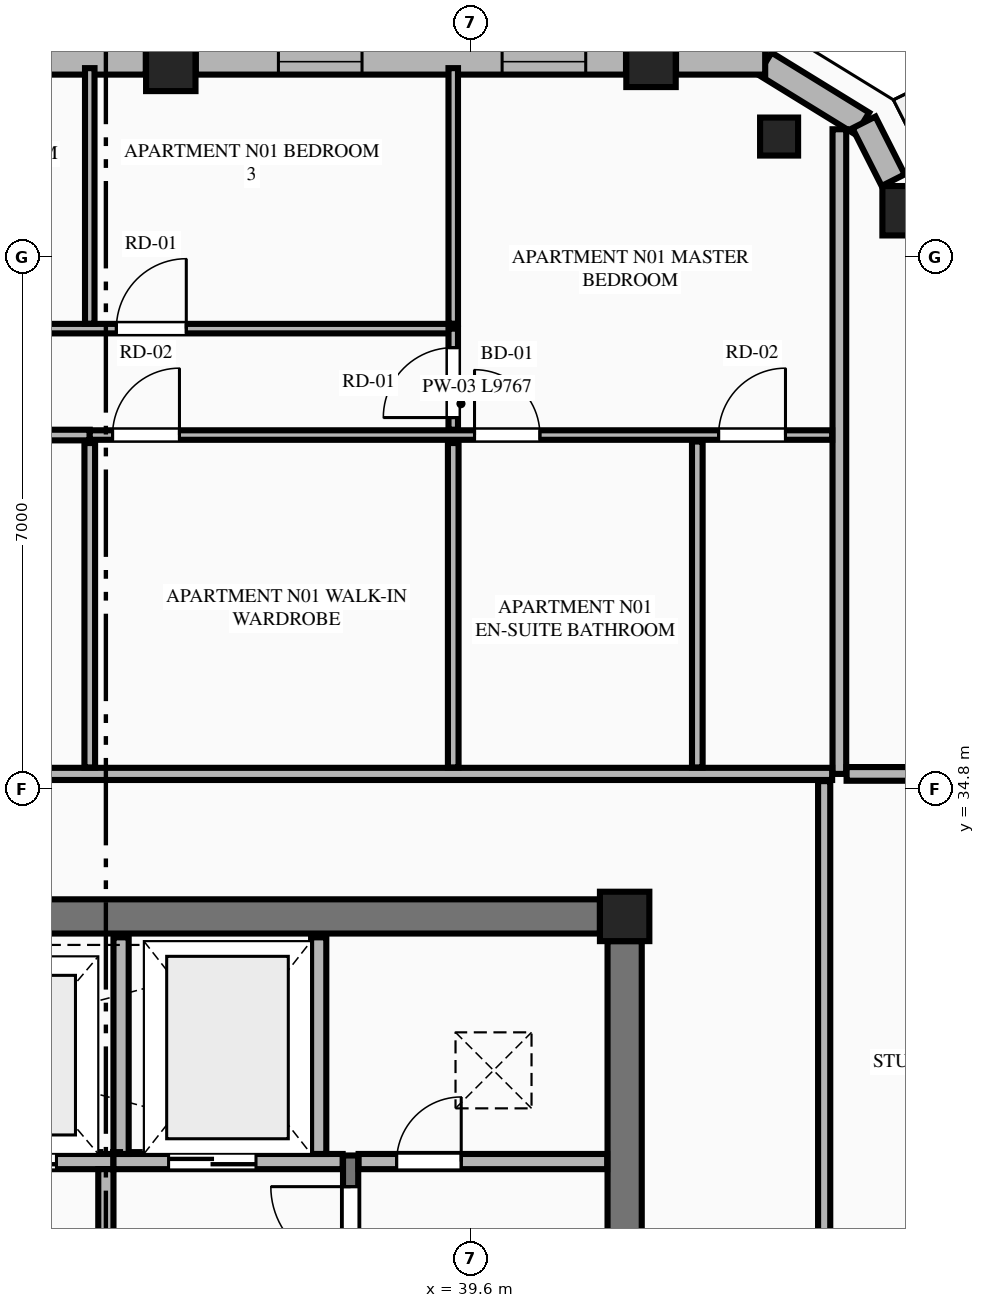
"""IFC4 building model, lengths in metres.
Left out: names, types, materials, properties, quantities, classifications, styles, units other than length and angle.
Written with IfcOpenShell. Run it as: python <this file> out.ifc"""

import sys

from ifc_helpers import new_model, si_unit, direction, frame, frame_2d, origin, origin_2d, place, context, subcontext, project, spatial, rectangle, extrude, element, fill, save


model = new_model("IFC4")
c1 = context("Model", 3, precision=1e-05, world=origin(), true_north=direction((0.0, 1.0)))
c2 = subcontext(c1, "Body", "Model", "MODEL_VIEW")
j1 = project(units=[si_unit("LENGTHUNIT", "METRE"), si_unit("PLANEANGLEUNIT", "RADIAN")], contexts=[c1])
p1 = place(None, origin())
s1 = spatial("IfcSite", under=j1, at=p1, CompositionType="ELEMENT")
p2 = place(p1, origin())
s2 = spatial("IfcBuilding", under=s1, at=p2, CompositionType="ELEMENT")
p3 = place(p2, frame((0.0, 0.0, 283.5)))
s3 = spatial("IfcBuildingStorey", under=s2, at=p3, CompositionType="ELEMENT", Elevation=283.5)
p4 = place(p3, frame((41.625, 33.125, 0.0), z_axis=(0.0, 0.0, 1.0), x_axis=(1.0, 0.0, 0.0)))
e1 = element("IfcColumn", 1, at=p4, inside=s3, PredefinedType="COLUMN", context=c2, shape_type="SweptSolid", body=[
    extrude(rectangle(XDim=0.65, YDim=0.65, at=origin_2d()), origin(), (0.0, 0.0, 1.0), 4.0),
])
p5 = place(p3, frame((23.5, 33.125, 0.0), z_axis=(0.0, 0.0, 1.0), x_axis=(1.0, 0.0, 0.0)))
e2 = element("IfcWall", 2, at=p5, inside=s3, PredefinedType="SHEAR", context=c2, shape_type="SweptSolid", body=[
    extrude(rectangle(XDim=17.8, YDim=0.45, at=frame_2d((8.9, 0.0))), origin(), (0.0, 0.0, 1.0), 3.8),
])
p6 = place(p3, frame((41.625, 19.0, 0.0), z_axis=(0.0, 0.0, 1.0), x_axis=(0.0, 1.0, 0.0)))
e3 = element("IfcWall", 3, at=p6, inside=s3, PredefinedType="SHEAR", context=c2, shape_type="SweptSolid", body=[
    extrude(rectangle(XDim=13.8, YDim=0.45, at=frame_2d((6.9, 0.0))), origin(), (0.0, 0.0, 1.0), 3.8),
])
p7 = place(p6, frame((2.84, 0.0, 0.0)))
e4 = element("IfcOpeningElement", 4, at=p7, cuts=e3, PredefinedType="OPENING", context=c2, shape_type="SweptSolid", body=[
    extrude(rectangle(XDim=1.22, YDim=2.25, at=frame_2d((0.61, 1.125))), frame((0.0, 0.235, 0.0), z_axis=(0.0, -1.0, 0.0), x_axis=(1.0, 0.0, 0.0)), (0.0, 0.0, 1.0), 0.47),
])
for number, where, z_axis, x_axis in (
    (5, (45.341, 42.409, 0.0), (0.0, 0.0, 1.0), (1.0, 0.0, 0.0)),
    (6, (41.972, 44.361, 0.0), (0.0, 0.0, 1.0), (1.0, 0.0, 0.0)),
    (7, (35.654, 44.308, 0.0), (0.0, 0.0, 1.0), (1.0, 0.0, 0.0)),
):
    element("IfcColumn", number, at=place(p3, frame(where, z_axis=z_axis, x_axis=x_axis)), inside=s3, PredefinedType="COLUMN", context=c2, shape_type="SweptSolid", body=[
        extrude(rectangle(XDim=0.65, YDim=0.65, at=origin_2d()), origin(), (0.0, 0.0, 1.0), 4.0),
    ])
p8 = place(p3, frame((43.657, 43.385, 0.0), z_axis=(0.0, 0.0, 1.0), x_axis=(-0.865256437757, 0.501329529272, 0.0)))
e8 = element("IfcColumn", 8, at=p8, inside=s3, PredefinedType="PILASTER", context=c2, shape_type="SweptSolid", body=[
    extrude(rectangle(XDim=0.5, YDim=0.35, at=origin_2d()), origin(), (0.0, 0.0, 1.0), 4.0),
])
p9 = place(p3, frame((38.02, 23.2, 0.0), z_axis=(0.0, 0.0, 1.0), x_axis=(0.0, 1.0, 0.0)))
e9 = element("IfcWall", 9, at=p9, inside=s3, PredefinedType="SHEAR", context=c2, shape_type="SweptSolid", body=[
    extrude(rectangle(XDim=6.78, YDim=0.2, at=frame_2d((3.39, 0.0))), origin(), (0.0, 0.0, 1.0), 4.0),
])
p10 = place(p9, frame((5.32, 0.0, 0.0)))
e10 = element("IfcOpeningElement", 10, at=p10, cuts=e9, PredefinedType="OPENING", context=c2, shape_type="SweptSolid", body=[
    extrude(rectangle(XDim=1.05, YDim=2.15, at=frame_2d((0.525, 1.075))), frame((0.0, 0.11, 0.0), z_axis=(0.0, -1.0, 0.0), x_axis=(1.0, 0.0, 0.0)), (0.0, 0.0, 1.0), 0.22),
])
p11 = place(p3, frame((29.9, 29.9, 0.0), z_axis=(0.0, 0.0, 1.0), x_axis=(1.0, 0.0, 0.0)))
e11 = element("IfcWall", 11, at=p11, inside=s3, PredefinedType="PLUMBINGWALL", context=c2, shape_type="SweptSolid", body=[
    extrude(rectangle(XDim=5.0, YDim=0.2, at=frame_2d((2.5, 0.0))), origin(), (0.0, 0.0, 1.0), 3.8),
])
p12 = place(p11, frame((0.75, 0.0, 0.0)))
e12 = element("IfcOpeningElement", 12, at=p12, cuts=e11, PredefinedType="OPENING", context=c2, shape_type="SweptSolid", body=[
    extrude(rectangle(XDim=1.1, YDim=2.2, at=frame_2d((0.55, 1.1))), frame((0.0, 0.11, 0.0), z_axis=(0.0, -1.0, 0.0), x_axis=(1.0, 0.0, 0.0)), (0.0, 0.0, 1.0), 0.22),
])
p13 = place(p11, frame((3.15, 0.0, 0.0)))
e13 = element("IfcOpeningElement", 13, at=p13, cuts=e11, PredefinedType="OPENING", context=c2, shape_type="SweptSolid", body=[
    extrude(rectangle(XDim=1.1, YDim=2.2, at=frame_2d((0.55, 1.1))), frame((0.0, 0.11, 0.0), z_axis=(0.0, -1.0, 0.0), x_axis=(1.0, 0.0, 0.0)), (0.0, 0.0, 1.0), 0.22),
])
p14 = place(p3, frame((34.9, 29.9, 0.0), z_axis=(0.0, 0.0, 1.0), x_axis=(1.0, 0.0, 0.0)))
e14 = element("IfcWall", 14, at=p14, inside=s3, PredefinedType="PLUMBINGWALL", context=c2, shape_type="SweptSolid", body=[
    extrude(rectangle(XDim=3.015, YDim=0.2, at=frame_2d((1.508, 0.0))), origin(), (0.0, 0.0, 1.0), 3.8),
])
p15 = place(p14, frame((0.725, 0.0, 0.0)))
e15 = element("IfcOpeningElement", 15, at=p15, cuts=e14, PredefinedType="OPENING", context=c2, shape_type="SweptSolid", body=[
    extrude(rectangle(XDim=1.15, YDim=2.2, at=frame_2d((0.575, 1.1))), frame((0.0, 0.11, 0.0), z_axis=(0.0, -1.0, 0.0), x_axis=(1.0, 0.0, 0.0)), (0.0, 0.0, 1.0), 0.22),
])
p16 = place(p3, frame((38.125, 29.9, 0.0), z_axis=(0.0, 0.0, 1.0), x_axis=(1.0, 0.0, 0.0)))
e16 = element("IfcWall", 16, at=p16, inside=s3, PredefinedType="PLUMBINGWALL", context=c2, shape_type="SweptSolid", body=[
    extrude(rectangle(XDim=3.27, YDim=0.2, at=frame_2d((1.635, 0.0))), origin(), (0.0, 0.0, 1.0), 3.8),
])
p17 = place(p16, frame((0.5, 0.0, 0.0)))
e17 = element("IfcOpeningElement", 17, at=p17, cuts=e16, PredefinedType="OPENING", context=c2, shape_type="SweptSolid", body=[
    extrude(rectangle(XDim=0.85, YDim=2.05, at=frame_2d((0.425, 1.025))), frame((0.0, 0.11, 0.0), z_axis=(0.0, -1.0, 0.0), x_axis=(1.0, 0.0, 0.0)), (0.0, 0.0, 1.0), 0.22),
])
for number, where, z_axis, x_axis in (
    (18, (35.0, 30.0, 0.0), (0.0, 0.0, 1.0), (0.0, 1.0, 0.0)),
    (19, (37.6, 30.0, 0.0), (0.0, 0.0, 1.0), (0.0, 1.0, 0.0)),
):
    element("IfcWall", number, at=place(p3, frame(where, z_axis=z_axis, x_axis=x_axis)), inside=s3, PredefinedType="PLUMBINGWALL", context=c2, shape_type="SweptSolid", body=[
        extrude(rectangle(XDim=2.85, YDim=0.2, at=frame_2d((1.425, 0.0))), origin(), (0.0, 0.0, 1.0), 3.8),
    ])
p18 = place(p3, frame((34.8, 27.05, 0.0), z_axis=(0.0, 0.0, 1.0), x_axis=(0.0, 1.0, 0.0)))
e20 = element("IfcWall", 20, at=p18, inside=s3, PredefinedType="PLUMBINGWALL", context=c2, shape_type="SweptSolid", body=[
    extrude(rectangle(XDim=2.75, YDim=0.2, at=frame_2d((1.375, 0.0))), origin(), (0.0, 0.0, 1.0), 3.8),
])
p19 = place(p18, frame((0.85, 0.0, 0.0)))
e21 = element("IfcOpeningElement", 21, at=p19, cuts=e20, PredefinedType="OPENING", context=c2, shape_type="SweptSolid", body=[
    extrude(rectangle(XDim=1.0, YDim=2.15, at=frame_2d((0.5, 1.075))), frame((0.0, 0.11, 0.0), z_axis=(0.0, -1.0, 0.0), x_axis=(1.0, 0.0, 0.0)), (0.0, 0.0, 1.0), 0.22),
])
p20 = place(p3, frame((44.753, 43.555, 0.0), z_axis=(0.0, 0.0, 1.0), x_axis=(-0.851680557619, 0.52406128246, 0.0)))
e22 = element("IfcWall", 22, at=p20, inside=s3, PredefinedType="STANDARD", context=c2, shape_type="SweptSolid", body=[
    extrude(rectangle(XDim=1.508, YDim=0.34, at=frame_2d((0.754, 0.0))), origin(), (0.0, 0.0, 1.0), 3.8),
])
p21 = place(p3, frame((45.158, 42.811, 0.0), z_axis=(0.0, 0.0, 1.0), x_axis=(-0.451907025977, 0.8920650424, 0.0)))
e23 = element("IfcWall", 23, at=p21, inside=s3, PredefinedType="STANDARD", context=c2, shape_type="SweptSolid", body=[
    extrude(rectangle(XDim=0.852, YDim=0.34, at=frame_2d((0.426, 0.0))), origin(), (0.0, 0.0, 1.0), 3.8),
])
p22 = place(p3, frame((43.474, 44.37, 0.0), z_axis=(0.0, 0.0, 1.0), x_axis=(-1.0, 0.0, 0.0)))
e24 = element("IfcWall", 24, at=p22, inside=s3, PredefinedType="STANDARD", context=c2, shape_type="SweptSolid", body=[
    extrude(rectangle(XDim=1.173, YDim=0.34, at=frame_2d((0.586, 0.0))), origin(), (0.0, 0.0, 1.0), 3.8),
])
p23 = place(p3, frame((41.643, 44.37, 0.0), z_axis=(0.0, 0.0, 1.0), x_axis=(-1.0, 0.0, 0.0)))
e25 = element("IfcWall", 25, at=p23, inside=s3, PredefinedType="STANDARD", context=c2, shape_type="SweptSolid", body=[
    extrude(rectangle(XDim=5.66, YDim=0.34, at=frame_2d((2.83, 0.0))), origin(), (0.0, 0.0, 1.0), 2.99),
])
p24 = place(p23, frame((0.53, 0.0, 0.75)))
e26 = element("IfcOpeningElement", 26, at=p24, cuts=e25, PredefinedType="OPENING", context=c2, shape_type="SweptSolid", body=[
    extrude(rectangle(XDim=1.1, YDim=2.0, at=frame_2d((0.55, 1.0))), frame((0.0, 0.18, 0.0), z_axis=(0.0, -1.0, 0.0), x_axis=(1.0, 0.0, 0.0)), (0.0, 0.0, 1.0), 0.36),
])
p25 = place(p23, frame((3.473, 0.0, 0.75)))
e27 = element("IfcOpeningElement", 27, at=p25, cuts=e25, PredefinedType="OPENING", context=c2, shape_type="SweptSolid", body=[
    extrude(rectangle(XDim=1.1, YDim=2.0, at=frame_2d((0.55, 1.0))), frame((0.0, 0.18, 0.0), z_axis=(0.0, -1.0, 0.0), x_axis=(1.0, 0.0, 0.0)), (0.0, 0.0, 1.0), 0.36),
])
p26 = place(p3, frame((35.325, 44.37, 0.0), z_axis=(0.0, 0.0, 1.0), x_axis=(-1.0, 0.0, 0.0)))
e28 = element("IfcWall", 28, at=p26, inside=s3, PredefinedType="STANDARD", context=c2, shape_type="SweptSolid", body=[
    extrude(rectangle(XDim=5.85, YDim=0.34, at=frame_2d((2.925, 0.0))), origin(), (0.0, 0.0, 1.0), 2.99),
])
p27 = place(p26, frame((2.375, 0.0, 0.75)))
e29 = element("IfcOpeningElement", 29, at=p27, cuts=e28, PredefinedType="OPENING", context=c2, shape_type="SweptSolid", body=[
    extrude(rectangle(XDim=1.1, YDim=2.0, at=frame_2d((0.55, 1.0))), frame((0.0, 0.18, 0.0), z_axis=(0.0, -1.0, 0.0), x_axis=(1.0, 0.0, 0.0)), (0.0, 0.0, 1.0), 0.36),
])
p28 = place(p3, frame((44.45, 35.0, 0.0), z_axis=(0.0, 0.0, 1.0), x_axis=(0.0, 1.0, 0.0)))
e30 = element("IfcWall", 30, at=p28, inside=s3, PredefinedType="PARTITIONING", context=c2, shape_type="SweptSolid", body=[
    extrude(rectangle(XDim=8.481, YDim=0.18, at=frame_2d((4.24, 0.0))), origin(), (0.0, 0.0, 1.0), 3.8),
])
p29 = place(p3, frame((20.445, 35.0, 0.0), z_axis=(0.0, 0.0, 1.0), x_axis=(1.0, 0.0, 0.0)))
e31 = element("IfcWall", 31, at=p29, inside=s3, PredefinedType="PARTITIONING", context=c2, shape_type="SweptSolid", body=[
    extrude(rectangle(XDim=23.91, YDim=0.16, at=frame_2d((11.955, 0.0))), origin(), (0.0, 0.0, 1.0), 3.8),
])
p30 = place(p29, frame((0.405, 0.0, 0.0)))
e32 = element("IfcOpeningElement", 32, at=p30, cuts=e31, PredefinedType="OPENING", context=c2, shape_type="SweptSolid", body=[
    extrude(rectangle(XDim=1.35, YDim=2.35, at=frame_2d((0.675, 1.175))), frame((0.0, 0.09, 0.0), z_axis=(0.0, -1.0, 0.0), x_axis=(1.0, 0.0, 0.0)), (0.0, 0.0, 1.0), 0.18),
])
p31 = place(p3, frame((29.508, 39.458, 0.0), z_axis=(0.0, 0.0, 1.0), x_axis=(1.0, 0.0, 0.0)))
e33 = element("IfcWall", 33, at=p31, inside=s3, PredefinedType="PLUMBINGWALL", context=c2, shape_type="SweptSolid", body=[
    extrude(rectangle(XDim=5.08, YDim=0.14, at=frame_2d((2.54, 0.0))), origin(), (0.0, 0.0, 1.0), 3.8),
])
p32 = place(p31, frame((0.3, 0.0, 0.0)))
e34 = element("IfcOpeningElement", 34, at=p32, cuts=e33, PredefinedType="OPENING", context=c2, shape_type="SweptSolid", body=[
    extrude(rectangle(XDim=0.88, YDim=2.15, at=frame_2d((0.44, 1.075))), frame((0.0, 0.08, 0.0), z_axis=(0.0, -1.0, 0.0), x_axis=(1.0, 0.0, 0.0)), (0.0, 0.0, 1.0), 0.16),
])
p33 = place(p3, frame((34.588, 39.458, 0.0), z_axis=(0.0, 0.0, 1.0), x_axis=(1.0, 0.0, 0.0)))
e35 = element("IfcWall", 35, at=p33, inside=s3, PredefinedType="PARTITIONING", context=c2, shape_type="SweptSolid", body=[
    extrude(rectangle(XDim=9.767, YDim=0.125, at=frame_2d((4.884, 0.0))), origin(), (0.0, 0.0, 1.0), 3.8),
])
p34 = place(p33, frame((5.062, 0.0, 0.0)))
e36 = element("IfcOpeningElement", 36, at=p34, cuts=e35, PredefinedType="OPENING", context=c2, shape_type="SweptSolid", body=[
    extrude(rectangle(XDim=0.86, YDim=2.1, at=frame_2d((0.43, 1.05))), frame((0.0, 0.073, 0.0), z_axis=(0.0, -1.0, 0.0), x_axis=(1.0, 0.0, 0.0)), (0.0, 0.0, 1.0), 0.145),
])
p35 = place(p33, frame((8.273, 0.0, 0.0)))
e37 = element("IfcOpeningElement", 37, at=p35, cuts=e35, PredefinedType="OPENING", context=c2, shape_type="SweptSolid", body=[
    extrude(rectangle(XDim=0.88, YDim=2.15, at=frame_2d((0.44, 1.075))), frame((0.0, 0.073, 0.0), z_axis=(0.0, -1.0, 0.0), x_axis=(1.0, 0.0, 0.0)), (0.0, 0.0, 1.0), 0.145),
])
p36 = place(p33, frame((0.3, 0.0, 0.0)))
e38 = element("IfcOpeningElement", 38, at=p36, cuts=e35, PredefinedType="OPENING", context=c2, shape_type="SweptSolid", body=[
    extrude(rectangle(XDim=0.88, YDim=2.15, at=frame_2d((0.44, 1.075))), frame((0.0, 0.073, 0.0), z_axis=(0.0, -1.0, 0.0), x_axis=(1.0, 0.0, 0.0)), (0.0, 0.0, 1.0), 0.145),
])
p37 = place(p3, frame((29.508, 40.858, 0.0), z_axis=(0.0, 0.0, 1.0), x_axis=(1.0, 0.0, 0.0)))
e39 = element("IfcWall", 39, at=p37, inside=s3, PredefinedType="PARTITIONING", context=c2, shape_type="SweptSolid", body=[
    extrude(rectangle(XDim=9.862, YDim=0.125, at=frame_2d((4.931, 0.0))), origin(), (0.0, 0.0, 1.0), 3.8),
])
p38 = place(p37, frame((0.35, 0.0, 0.0)))
e40 = element("IfcOpeningElement", 40, at=p38, cuts=e39, PredefinedType="OPENING", context=c2, shape_type="SweptSolid", body=[
    extrude(rectangle(XDim=0.92, YDim=2.15, at=frame_2d((0.46, 1.075))), frame((0.0, 0.073, 0.0), z_axis=(0.0, -1.0, 0.0), x_axis=(1.0, 0.0, 0.0)), (0.0, 0.0, 1.0), 0.145),
])
p39 = place(p37, frame((5.43, 0.0, 0.0)))
e41 = element("IfcOpeningElement", 41, at=p39, cuts=e39, PredefinedType="OPENING", context=c2, shape_type="SweptSolid", body=[
    extrude(rectangle(XDim=0.92, YDim=2.15, at=frame_2d((0.46, 1.075))), frame((0.0, 0.073, 0.0), z_axis=(0.0, -1.0, 0.0), x_axis=(1.0, 0.0, 0.0)), (0.0, 0.0, 1.0), 0.145),
])
p40 = place(p3, frame((39.37, 39.528, 0.0), z_axis=(0.0, 0.0, 1.0), x_axis=(0.0, 1.0, 0.0)))
e42 = element("IfcWall", 42, at=p40, inside=s3, PredefinedType="PARTITIONING", context=c2, shape_type="SweptSolid", body=[
    extrude(rectangle(XDim=1.33, YDim=0.125, at=frame_2d((0.665, 0.0))), origin(), (0.0, 0.0, 1.0), 3.8),
])
p41 = place(p40, frame((0.16, 0.0, 0.0)))
e43 = element("IfcOpeningElement", 43, at=p41, cuts=e42, PredefinedType="OPENING", context=c2, shape_type="SweptSolid", body=[
    extrude(rectangle(XDim=0.92, YDim=2.15, at=frame_2d((0.46, 1.075))), frame((0.0, 0.073, 0.0), z_axis=(0.0, -1.0, 0.0), x_axis=(1.0, 0.0, 0.0)), (0.0, 0.0, 1.0), 0.145),
])
p42 = place(p3, frame((34.588, 35.085, 0.0), z_axis=(0.0, 0.0, 1.0), x_axis=(0.0, 1.0, 0.0)))
e44 = element("IfcWall", 44, at=p42, inside=s3, PredefinedType="PLUMBINGWALL", context=c2, shape_type="SweptSolid", body=[
    extrude(rectangle(XDim=4.268, YDim=0.14, at=frame_2d((2.134, 0.0))), origin(), (0.0, 0.0, 1.0), 3.8),
])
for number, where, z_axis, x_axis in (
    (45, (34.588, 40.923, 0.0), (0.0, 0.0, 1.0), (0.0, 1.0, 0.0)),
    (46, (39.37, 40.923, 0.0), (0.0, 0.0, 1.0), (0.0, 1.0, 0.0)),
):
    element("IfcWall", number, at=place(p3, frame(where, z_axis=z_axis, x_axis=x_axis)), inside=s3, PredefinedType="PARTITIONING", context=c2, shape_type="SweptSolid", body=[
        extrude(rectangle(XDim=3.362, YDim=0.125, at=frame_2d((1.681, 0.0))), origin(), (0.0, 0.0, 1.0), 3.8),
    ])
p43 = place(p3, frame((39.37, 35.085, 0.0), z_axis=(0.0, 0.0, 1.0), x_axis=(0.0, 1.0, 0.0)))
e47 = element("IfcWall", 47, at=p43, inside=s3, PredefinedType="PLUMBINGWALL", context=c2, shape_type="SweptSolid", body=[
    extrude(rectangle(XDim=4.268, YDim=0.14, at=frame_2d((2.134, 0.0))), origin(), (0.0, 0.0, 1.0), 3.8),
])
p44 = place(p3, frame((42.581, 35.085, 0.0), z_axis=(0.0, 0.0, 1.0), x_axis=(0.0, 1.0, 0.0)))
e48 = element("IfcWall", 48, at=p44, inside=s3, PredefinedType="PLUMBINGWALL", context=c2, shape_type="SweptSolid", body=[
    extrude(rectangle(XDim=4.288, YDim=0.14, at=frame_2d((2.144, 0.0))), origin(), (0.0, 0.0, 1.0), 3.8),
])
p45 = place(p3, frame((44.545, 35.0, 0.0), z_axis=(0.0, 0.0, 1.0), x_axis=(1.0, 0.0, 0.0)))
e49 = element("IfcWall", 49, at=p45, inside=s3, PredefinedType="PARTITIONING", context=c2, shape_type="SweptSolid", body=[
    extrude(rectangle(XDim=4.322, YDim=0.18, at=frame_2d((2.161, 0.0))), origin(), (0.0, 0.0, 1.0), 3.8),
])
p46 = place(p3, frame((44.25, 16.495, 0.0), z_axis=(0.0, 0.0, 1.0), x_axis=(0.0, 1.0, 0.0)))
e50 = element("IfcWall", 50, at=p46, inside=s3, PredefinedType="PARTITIONING", context=c2, shape_type="SweptSolid", body=[
    extrude(rectangle(XDim=18.41, YDim=0.16, at=frame_2d((9.205, 0.0))), origin(), (0.0, 0.0, 1.0), 3.487),
])
p47 = place(p46, frame((0.4, 0.0, 0.0)))
e51 = element("IfcOpeningElement", 51, at=p47, cuts=e50, PredefinedType="OPENING", context=c2, shape_type="SweptSolid", body=[
    extrude(rectangle(XDim=1.02, YDim=2.25, at=frame_2d((0.51, 1.125))), frame((0.0, 0.09, 0.0), z_axis=(0.0, -1.0, 0.0), x_axis=(1.0, 0.0, 0.0)), (0.0, 0.0, 1.0), 0.18),
])
p48 = place(p10, origin())
e52 = element("IfcDoor", 52, at=p48, inside=s3, OperationType="SINGLE_SWING_RIGHT", PredefinedType="DOOR", context=c2, shape_type="SweptSolid", body=[
    extrude(rectangle(XDim=1.05, YDim=2.15, at=frame_2d((0.525, 1.075))), frame((0.0, 0.025, 0.0), z_axis=(0.0, -1.0, 0.0), x_axis=(1.0, 0.0, 0.0)), (0.0, 0.0, 1.0), 0.05),
])
fill(e10, e52)
p49 = place(p17, origin())
e53 = element("IfcDoor", 53, at=p49, inside=s3, OperationType="SINGLE_SWING_RIGHT", PredefinedType="DOOR", context=c2, shape_type="SweptSolid", body=[
    extrude(rectangle(XDim=0.85, YDim=2.05, at=frame_2d((0.425, 1.025))), frame((0.0, 0.025, 0.0), z_axis=(0.0, -1.0, 0.0), x_axis=(1.0, 0.0, 0.0)), (0.0, 0.0, 1.0), 0.05),
])
fill(e17, e53)
p50 = place(p15, origin())
e54 = element("IfcDoor", 54, at=p50, inside=s3, OperationType="DOUBLE_DOOR_SLIDING", PredefinedType="DOOR", context=c2, shape_type="SweptSolid", body=[
    extrude(rectangle(XDim=1.15, YDim=2.2, at=frame_2d((0.575, 1.1))), frame((0.0, 0.025, 0.0), z_axis=(0.0, -1.0, 0.0), x_axis=(1.0, 0.0, 0.0)), (0.0, 0.0, 1.0), 0.05),
])
fill(e15, e54)
p51 = place(p13, origin())
e55 = element("IfcDoor", 55, at=p51, inside=s3, OperationType="DOUBLE_DOOR_SLIDING", PredefinedType="DOOR", context=c2, shape_type="SweptSolid", body=[
    extrude(rectangle(XDim=1.1, YDim=2.2, at=frame_2d((0.55, 1.1))), frame((0.0, 0.025, 0.0), z_axis=(0.0, -1.0, 0.0), x_axis=(1.0, 0.0, 0.0)), (0.0, 0.0, 1.0), 0.05),
])
fill(e13, e55)
p52 = place(p24, origin())
e56 = element("IfcWindow", 56, at=p52, inside=s3, PartitioningType="SINGLE_PANEL", PredefinedType="WINDOW", context=c2, shape_type="SweptSolid", body=[
    extrude(rectangle(XDim=1.1, YDim=2.0, at=frame_2d((0.55, 1.0))), frame((0.0, 0.03, 0.0), z_axis=(0.0, -1.0, 0.0), x_axis=(1.0, 0.0, 0.0)), (0.0, 0.0, 1.0), 0.06),
])
fill(e26, e56)
p53 = place(p34, origin())
e57 = element("IfcDoor", 57, at=p53, inside=s3, OperationType="SINGLE_SWING_LEFT", PredefinedType="DOOR", context=c2, shape_type="SweptSolid", body=[
    extrude(rectangle(XDim=0.86, YDim=2.1, at=frame_2d((0.43, 1.05))), frame((0.0, 0.025, 0.0), z_axis=(0.0, -1.0, 0.0), x_axis=(1.0, 0.0, 0.0)), (0.0, 0.0, 1.0), 0.05),
])
fill(e36, e57)
p54 = place(p35, origin())
e58 = element("IfcDoor", 58, at=p54, inside=s3, OperationType="SINGLE_SWING_RIGHT", PredefinedType="DOOR", context=c2, shape_type="SweptSolid", body=[
    extrude(rectangle(XDim=0.88, YDim=2.15, at=frame_2d((0.44, 1.075))), frame((0.0, 0.025, 0.0), z_axis=(0.0, -1.0, 0.0), x_axis=(1.0, 0.0, 0.0)), (0.0, 0.0, 1.0), 0.05),
])
fill(e37, e58)
p55 = place(p39, origin())
e59 = element("IfcDoor", 59, at=p55, inside=s3, OperationType="SINGLE_SWING_RIGHT", PredefinedType="DOOR", context=c2, shape_type="SweptSolid", body=[
    extrude(rectangle(XDim=0.92, YDim=2.15, at=frame_2d((0.46, 1.075))), frame((0.0, 0.025, 0.0), z_axis=(0.0, -1.0, 0.0), x_axis=(1.0, 0.0, 0.0)), (0.0, 0.0, 1.0), 0.05),
])
fill(e41, e59)
p56 = place(p41, origin())
e60 = element("IfcDoor", 60, at=p56, inside=s3, OperationType="SINGLE_SWING_LEFT", PredefinedType="DOOR", context=c2, shape_type="SweptSolid", body=[
    extrude(rectangle(XDim=0.92, YDim=2.15, at=frame_2d((0.46, 1.075))), frame((0.0, 0.025, 0.0), z_axis=(0.0, -1.0, 0.0), x_axis=(1.0, 0.0, 0.0)), (0.0, 0.0, 1.0), 0.05),
])
fill(e43, e60)
p57 = place(p36, origin())
e61 = element("IfcDoor", 61, at=p57, inside=s3, OperationType="SINGLE_SWING_RIGHT", PredefinedType="DOOR", context=c2, shape_type="SweptSolid", body=[
    extrude(rectangle(XDim=0.88, YDim=2.15, at=frame_2d((0.44, 1.075))), frame((0.0, 0.025, 0.0), z_axis=(0.0, -1.0, 0.0), x_axis=(1.0, 0.0, 0.0)), (0.0, 0.0, 1.0), 0.05),
])
fill(e38, e61)
p58 = place(p25, origin())
e62 = element("IfcWindow", 62, at=p58, inside=s3, PartitioningType="SINGLE_PANEL", PredefinedType="WINDOW", context=c2, shape_type="SweptSolid", body=[
    extrude(rectangle(XDim=1.1, YDim=2.0, at=frame_2d((0.55, 1.0))), frame((0.0, 0.03, 0.0), z_axis=(0.0, -1.0, 0.0), x_axis=(1.0, 0.0, 0.0)), (0.0, 0.0, 1.0), 0.06),
])
fill(e27, e62)
save(model, sys.argv[1])
